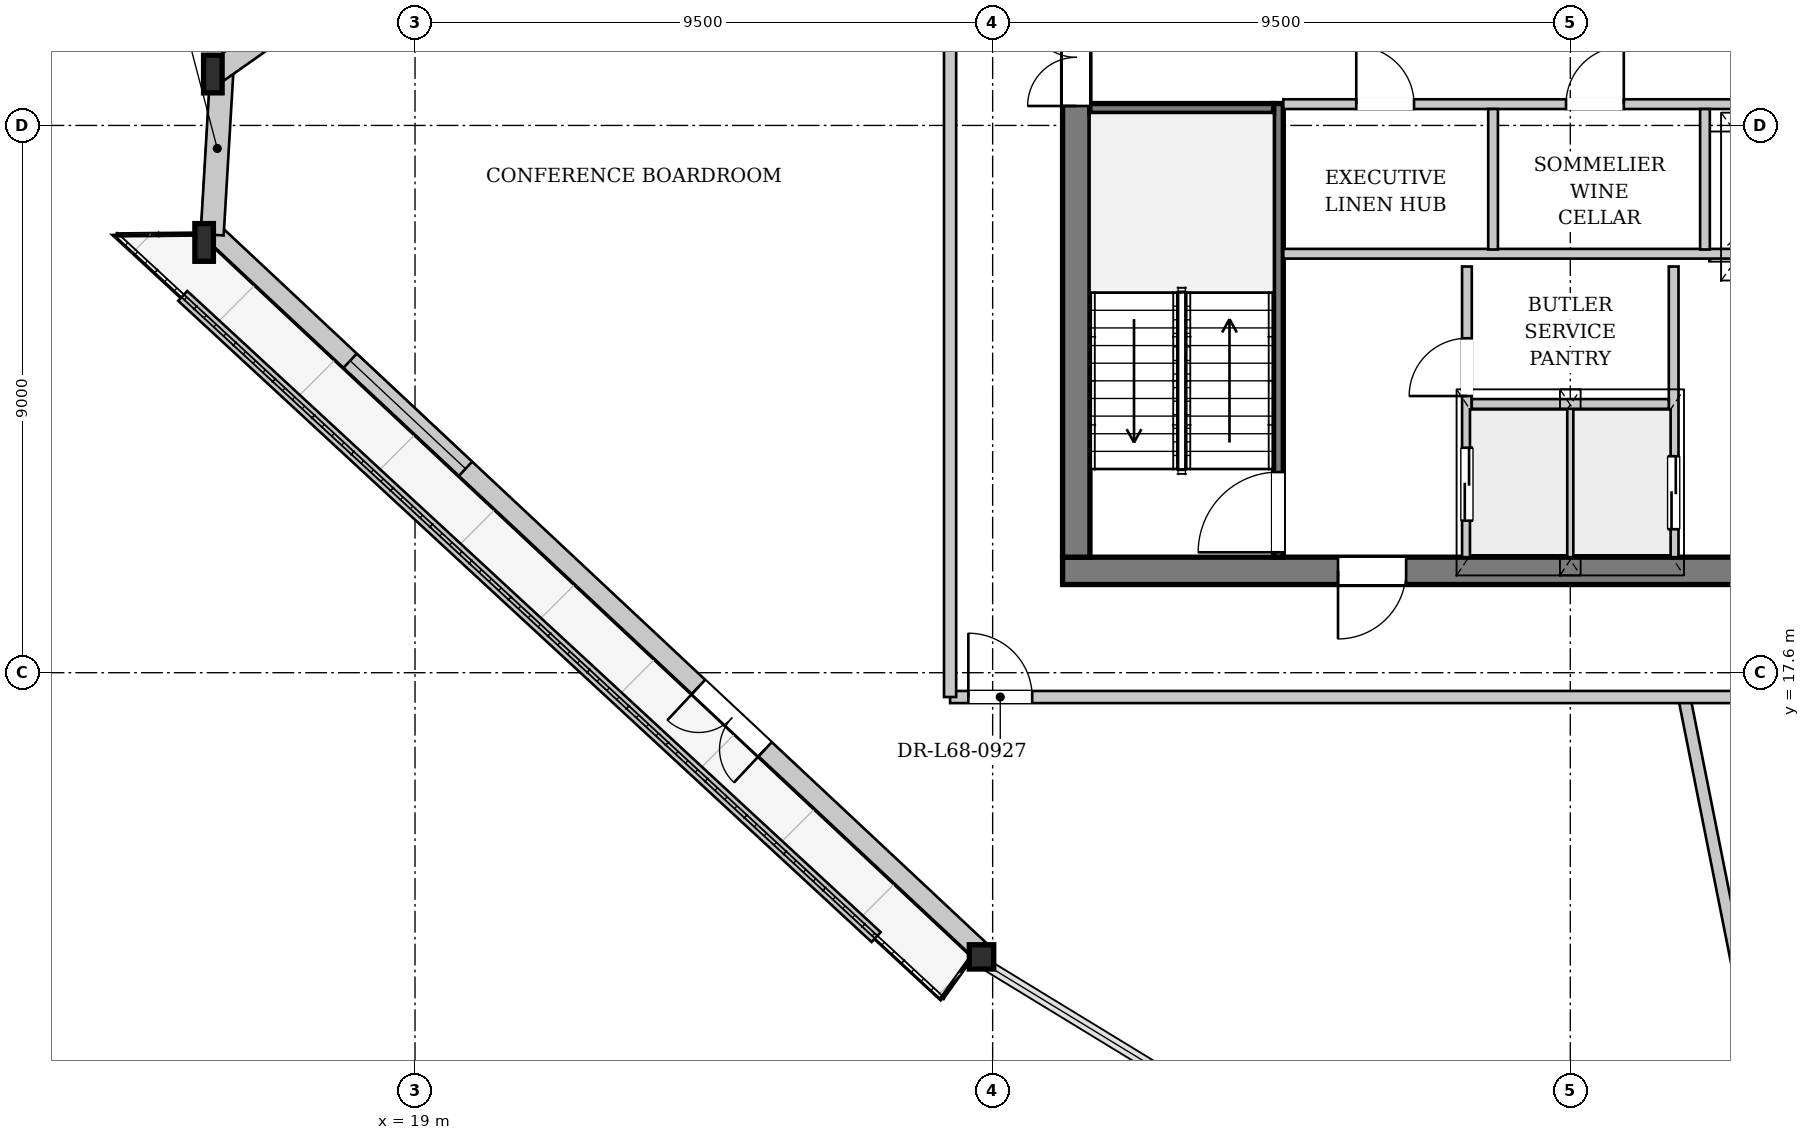
"""IFC4 building model, lengths in metres.
Left out: names, types, materials, properties, quantities, classifications, styles, units other than length and angle.
Written with IfcOpenShell. Run it as: python <this file> out.ifc"""

import sys

from ifc_helpers import new_model, si_unit, direction, frame, frame_2d, origin, origin_2d, place, context, subcontext, project, spatial, rectangle, i_section, extrude, source, transform, mapped, element, fill, save


model = new_model("IFC4")
c1 = context("Model", 3, precision=1e-05, world=origin(), true_north=direction((0.0, 1.0)))
c2 = subcontext(c1, "Body", "Model", "MODEL_VIEW")
j1 = project(units=[si_unit("LENGTHUNIT", "METRE"), si_unit("PLANEANGLEUNIT", "RADIAN")], contexts=[c1])
p1 = place(None, origin())
s1 = spatial("IfcSite", under=j1, at=p1, CompositionType="ELEMENT")
p2 = place(p1, origin())
s2 = spatial("IfcBuilding", under=s1, at=p2, CompositionType="ELEMENT")
p3 = place(p2, frame((0.0, 0.0, 256.1)))
s3 = spatial("IfcBuildingStorey", under=s2, at=p3, CompositionType="ELEMENT", Elevation=256.1)
m1 = source(origin(), c2, "Body", "SweptSolid", [
    extrude(i_section(OverallWidth=0.305, OverallDepth=0.62, WebThickness=0.021, FlangeThickness=0.04, at=origin_2d()), origin(), (0.0, 0.0, 1.0), 3.46),
])
p4 = place(p3, frame((15.642, 27.651, 0.0), z_axis=(0.018981595146, -0.118617328776, 0.992758595208), x_axis=(0.987436966063, 0.158013410988, 0.0)))
e1 = element("IfcColumn", 1, at=p4, inside=s3, PredefinedType="COLUMN", context=c2, shape_type="MappedRepresentation", body=[
    mapped(m1, transform((0.0, 0.0, 0.0), x_axis=(1.0, 0.0, 0.0), y_axis=(0.0, 1.0, 0.0), z_axis=(0.0, 0.0, 1.0), scale=1.0)),
])
m2 = source(origin(), c2, "Body", "SweptSolid", [
    extrude(i_section(OverallWidth=0.305, OverallDepth=0.62, WebThickness=0.021, FlangeThickness=0.04, at=origin_2d()), origin(), (0.0, 0.0, 1.0), 3.448),
])
p5 = place(p3, frame((15.474, 24.814, 0.0), z_axis=(0.03363437242, -0.080156020168, 0.996214706488), x_axis=(0.922110017929, 0.386927790209, 0.0)))
e2 = element("IfcColumn", 2, at=p5, inside=s3, PredefinedType="COLUMN", context=c2, shape_type="MappedRepresentation", body=[
    mapped(m2, transform((0.0, 0.0, 0.0), x_axis=(1.0, 0.0, 0.0), y_axis=(0.0, 1.0, 0.0), z_axis=(0.0, 0.0, 1.0), scale=1.0)),
])
m3 = source(origin(), c2, "Body", "SweptSolid", [
    extrude(i_section(OverallWidth=0.401, OverallDepth=0.399, WebThickness=0.022, FlangeThickness=0.034, at=origin_2d()), origin(), (0.0, 0.0, 1.0), 3.449),
])
p6 = place(p3, frame((28.162, 12.937, 0.0), z_axis=(0.089761957636, -0.005663214993, 0.995947146669), x_axis=(0.062966287351, 0.998015654515, 0.0)))
e3 = element("IfcColumn", 3, at=p6, inside=s3, PredefinedType="COLUMN", context=c2, shape_type="MappedRepresentation", body=[
    mapped(m3, transform((0.0, 0.0, 0.0), x_axis=(1.0, 0.0, 0.0), y_axis=(0.0, 1.0, 0.0), z_axis=(0.0, 0.0, 1.0), scale=1.0)),
])
p7 = place(p3, frame((28.271, 13.053, 0.0), z_axis=(0.0, 0.0, 1.0), x_axis=(-0.730047343923, 0.683396572739, 0.0)))
e4 = element("IfcWall", 4, at=p7, inside=s3, PredefinedType="SOLIDWALL", context=c2, shape_type="SweptSolid", body=[
    extrude(rectangle(XDim=17.38, YDim=0.32, at=frame_2d((8.69, 0.0))), origin(), (0.0, 0.0, 1.0), 2.872),
])
p8 = place(p7, frame((4.812, 0.0, 0.0)))
e5 = element("IfcOpeningElement", 5, at=p8, cuts=e4, PredefinedType="OPENING", context=c2, shape_type="SweptSolid", body=[
    extrude(rectangle(XDim=1.5, YDim=2.3, at=frame_2d((0.75, 1.15))), frame((0.0, 0.17, 0.0), z_axis=(0.0, -1.0, 0.0), x_axis=(1.0, 0.0, 0.0)), (0.0, 0.0, 1.0), 0.34),
])
p9 = place(p7, frame((11.561, 0.0, 0.402)))
e6 = element("IfcOpeningElement", 6, at=p9, cuts=e4, PredefinedType="OPENING", context=c2, shape_type="SweptSolid", body=[
    extrude(rectangle(XDim=2.6, YDim=2.35, at=frame_2d((1.3, 1.175))), frame((0.0, 0.17, 0.0), z_axis=(0.0, -1.0, 0.0), x_axis=(1.0, 0.0, 0.0)), (0.0, 0.0, 1.0), 0.34),
])
p10 = place(p3, frame((15.664, 24.802, 0.0), z_axis=(0.0, 0.0, 1.0), x_axis=(0.05918528466, 0.998247014561, 0.0)))
e7 = element("IfcWall", 7, at=p10, inside=s3, PredefinedType="SOLIDWALL", context=c2, shape_type="SweptSolid", body=[
    extrude(rectangle(XDim=2.842, YDim=0.38, at=frame_2d((1.421, 0.0))), origin(), (0.0, 0.0, 1.0), 2.872),
])
p11 = place(p3, frame((15.751, 27.495, 0.0), z_axis=(0.0, 0.0, 1.0), x_axis=(0.818194527571, 0.574941488373, 0.0)))
e8 = element("IfcWall", 8, at=p11, inside=s3, PredefinedType="SOLIDWALL", context=c2, shape_type="SweptSolid", body=[
    extrude(rectangle(XDim=21.931, YDim=0.38, at=frame_2d((10.965, 0.0))), origin(), (0.0, 0.0, 1.0), 2.872),
])
p12 = place(p11, frame((5.041, 0.0, 0.502)))
e9 = element("IfcOpeningElement", 9, at=p12, cuts=e8, PredefinedType="OPENING", context=c2, shape_type="SweptSolid", body=[
    extrude(rectangle(XDim=2.2, YDim=2.25, at=frame_2d((1.1, 1.125))), frame((0.0, 0.2, 0.0), z_axis=(0.0, -1.0, 0.0), x_axis=(1.0, 0.0, 0.0)), (0.0, 0.0, 1.0), 0.4),
])
p13 = place(p11, frame((15.79, 0.0, 0.502)))
e10 = element("IfcOpeningElement", 10, at=p13, cuts=e8, PredefinedType="OPENING", context=c2, shape_type="SweptSolid", body=[
    extrude(rectangle(XDim=2.2, YDim=2.25, at=frame_2d((1.1, 1.125))), frame((0.0, 0.2, 0.0), z_axis=(0.0, -1.0, 0.0), x_axis=(1.0, 0.0, 0.0)), (0.0, 0.0, 1.0), 0.4),
])
p14 = place(p3, frame((15.181, 23.796, 0.0), z_axis=(0.0, 0.0, 1.0), x_axis=(0.734232444262, -0.678898164523, 0.0)))
e11 = element("IfcWall", 11, at=p14, inside=s3, PredefinedType="PARAPET", context=c2, shape_type="SweptSolid", body=[
    extrude(rectangle(XDim=15.531, YDim=0.22, at=frame_2d((7.765, 0.0))), origin(), (0.0, 0.0, 1.0), 0.3),
])
p15 = place(p3, frame((46.35, 19.275, 0.0), z_axis=(0.0, 0.0, 1.0), x_axis=(-1.0, 0.0, 0.0)))
e12 = element("IfcWall", 12, at=p15, inside=s3, PredefinedType="SHEAR", context=c2, shape_type="SweptSolid", body=[
    extrude(rectangle(XDim=16.7, YDim=0.45, at=frame_2d((8.35, 0.0))), origin(), (0.0, 0.0, 1.0), 3.38),
])
p16 = place(p15, frame((4.55, 0.0, 0.0)))
e13 = element("IfcOpeningElement", 13, at=p16, cuts=e12, PredefinedType="OPENING", context=c2, shape_type="SweptSolid", body=[
    extrude(rectangle(XDim=1.12, YDim=2.25, at=frame_2d((0.56, 1.125))), frame((0.0, 0.235, 0.0), z_axis=(0.0, -1.0, 0.0), x_axis=(1.0, 0.0, 0.0)), (0.0, 0.0, 1.0), 0.47),
])
p17 = place(p15, frame((11.05, 0.0, 0.0)))
e14 = element("IfcOpeningElement", 14, at=p17, cuts=e12, PredefinedType="OPENING", context=c2, shape_type="SweptSolid", body=[
    extrude(rectangle(XDim=1.12, YDim=2.25, at=frame_2d((0.56, 1.125))), frame((0.0, 0.235, 0.0), z_axis=(0.0, -1.0, 0.0), x_axis=(1.0, 0.0, 0.0)), (0.0, 0.0, 1.0), 0.47),
])
p18 = place(p3, frame((29.875, 19.5, 0.0), z_axis=(0.0, 0.0, 1.0), x_axis=(0.0, 1.0, 0.0)))
e15 = element("IfcWall", 15, at=p18, inside=s3, PredefinedType="SHEAR", context=c2, shape_type="SweptSolid", body=[
    extrude(rectangle(XDim=14.2, YDim=0.45, at=frame_2d((7.1, 0.0))), origin(), (0.0, 0.0, 1.0), 3.38),
])
p19 = place(p18, frame((7.42, 0.0, 0.0)))
e16 = element("IfcOpeningElement", 16, at=p19, cuts=e15, PredefinedType="OPENING", context=c2, shape_type="SweptSolid", body=[
    extrude(rectangle(XDim=1.6, YDim=2.2, at=frame_2d((0.8, 1.1))), frame((0.0, 0.235, 0.0), z_axis=(0.0, -1.0, 0.0), x_axis=(1.0, 0.0, 0.0)), (0.0, 0.0, 1.0), 0.47),
])
p20 = place(p3, frame((33.2, 19.5, 0.0), z_axis=(0.0, 0.0, 1.0), x_axis=(0.0, 1.0, 0.0)))
e17 = element("IfcWall", 17, at=p20, inside=s3, PredefinedType="PARTITIONING", context=c2, shape_type="SweptSolid", body=[
    extrude(rectangle(XDim=7.46, YDim=0.16, at=frame_2d((3.73, 0.0))), origin(), (0.0, 0.0, 1.0), 3.38),
])
p21 = place(p20, frame((0.08, 0.0, 0.0)))
e18 = element("IfcOpeningElement", 18, at=p21, cuts=e17, PredefinedType="OPENING", context=c2, shape_type="SweptSolid", body=[
    extrude(rectangle(XDim=1.32, YDim=2.2, at=frame_2d((0.66, 1.1))), frame((0.0, 0.09, 0.0), z_axis=(0.0, -1.0, 0.0), x_axis=(1.0, 0.0, 0.0)), (0.0, 0.0, 1.0), 0.18),
])
p22 = place(p3, frame((30.1, 26.88, 0.0), z_axis=(0.0, 0.0, 1.0), x_axis=(1.0, 0.0, 0.0)))
e19 = element("IfcWall", 19, at=p22, inside=s3, PredefinedType="PARTITIONING", context=c2, shape_type="SweptSolid", body=[
    extrude(rectangle(XDim=3.02, YDim=0.16, at=frame_2d((1.51, 0.0))), origin(), (0.0, 0.0, 1.0), 3.38),
])
p23 = place(p3, frame((36.3, 19.5, 0.0), z_axis=(0.0, 0.0, 1.0), x_axis=(0.0, 1.0, 0.0)))
e20 = element("IfcWall", 20, at=p23, inside=s3, PredefinedType="PARTITIONING", context=c2, shape_type="SweptSolid", body=[
    extrude(rectangle(XDim=4.78, YDim=0.16, at=frame_2d((2.39, 0.0))), origin(), (0.0, 0.0, 1.0), 3.38),
])
p24 = place(p23, frame((0.6, 0.0, 0.0)))
e21 = element("IfcOpeningElement", 21, at=p24, cuts=e20, PredefinedType="OPENING", context=c2, shape_type="SweptSolid", body=[
    extrude(rectangle(XDim=1.2, YDim=2.2, at=frame_2d((0.6, 1.1))), frame((0.0, 0.09, 0.0), z_axis=(0.0, -1.0, 0.0), x_axis=(1.0, 0.0, 0.0)), (0.0, 0.0, 1.0), 0.18),
])
p25 = place(p23, frame((2.65, 0.0, 0.0)))
e22 = element("IfcOpeningElement", 22, at=p25, cuts=e20, PredefinedType="OPENING", context=c2, shape_type="SweptSolid", body=[
    extrude(rectangle(XDim=0.95, YDim=2.1, at=frame_2d((0.475, 1.05))), frame((0.0, 0.09, 0.0), z_axis=(0.0, -1.0, 0.0), x_axis=(1.0, 0.0, 0.0)), (0.0, 0.0, 1.0), 0.18),
])
p26 = place(p3, frame((39.7, 24.28, 0.0), z_axis=(0.0, 0.0, 1.0), x_axis=(0.0, -1.0, 0.0)))
e23 = element("IfcWall", 23, at=p26, inside=s3, PredefinedType="PARTITIONING", context=c2, shape_type="SweptSolid", body=[
    extrude(rectangle(XDim=4.78, YDim=0.16, at=frame_2d((2.39, 0.0))), origin(), (0.0, 0.0, 1.0), 3.38),
])
p27 = place(p26, frame((3.12, 0.0, 0.0)))
e24 = element("IfcOpeningElement", 24, at=p27, cuts=e23, PredefinedType="OPENING", context=c2, shape_type="SweptSolid", body=[
    extrude(rectangle(XDim=1.2, YDim=2.2, at=frame_2d((0.6, 1.1))), frame((0.0, 0.09, 0.0), z_axis=(0.0, -1.0, 0.0), x_axis=(1.0, 0.0, 0.0)), (0.0, 0.0, 1.0), 0.18),
])
p28 = place(p3, frame((38.0, 19.5, 0.0), z_axis=(0.0, 0.0, 1.0), x_axis=(0.0, 1.0, 0.0)))
e25 = element("IfcWall", 25, at=p28, inside=s3, PredefinedType="PARTITIONING", context=c2, shape_type="SweptSolid", body=[
    extrude(rectangle(XDim=2.46, YDim=0.125, at=frame_2d((1.23, 0.0))), origin(), (0.0, 0.0, 1.0), 3.38),
])
p29 = place(p3, frame((36.38, 22.02, 0.0), z_axis=(0.0, 0.0, 1.0), x_axis=(1.0, 0.0, 0.0)))
e26 = element("IfcWall", 26, at=p29, inside=s3, PredefinedType="PARTITIONING", context=c2, shape_type="SweptSolid", body=[
    extrude(rectangle(XDim=3.24, YDim=0.16, at=frame_2d((1.62, 0.0))), origin(), (0.0, 0.0, 1.0), 3.38),
])
p30 = place(p3, frame((33.28, 24.49, 0.0), z_axis=(0.0, 0.0, 1.0), x_axis=(1.0, 0.0, 0.0)))
e27 = element("IfcWall", 27, at=p30, inside=s3, PredefinedType="PARTITIONING", context=c2, shape_type="SweptSolid", body=[
    extrude(rectangle(XDim=9.44, YDim=0.16, at=frame_2d((4.72, 0.0))), origin(), (0.0, 0.0, 1.0), 3.38),
])
p31 = place(p3, frame((33.28, 26.95, 0.0), z_axis=(0.0, 0.0, 1.0), x_axis=(1.0, 0.0, 0.0)))
e28 = element("IfcWall", 28, at=p31, inside=s3, PredefinedType="PARTITIONING", context=c2, shape_type="SweptSolid", body=[
    extrude(rectangle(XDim=9.44, YDim=0.16, at=frame_2d((4.72, 0.0))), origin(), (0.0, 0.0, 1.0), 3.38),
])
p32 = place(p31, frame((1.2, 0.0, 0.0)))
e29 = element("IfcOpeningElement", 29, at=p32, cuts=e28, PredefinedType="OPENING", context=c2, shape_type="SweptSolid", body=[
    extrude(rectangle(XDim=0.95, YDim=2.1, at=frame_2d((0.475, 1.05))), frame((0.0, 0.09, 0.0), z_axis=(0.0, -1.0, 0.0), x_axis=(1.0, 0.0, 0.0)), (0.0, 0.0, 1.0), 0.18),
])
p33 = place(p31, frame((4.65, 0.0, 0.0)))
e30 = element("IfcOpeningElement", 30, at=p33, cuts=e28, PredefinedType="OPENING", context=c2, shape_type="SweptSolid", body=[
    extrude(rectangle(XDim=0.95, YDim=2.1, at=frame_2d((0.475, 1.05))), frame((0.0, 0.09, 0.0), z_axis=(0.0, -1.0, 0.0), x_axis=(1.0, 0.0, 0.0)), (0.0, 0.0, 1.0), 0.18),
])
p34 = place(p31, frame((7.67, 0.0, 0.0)))
e31 = element("IfcOpeningElement", 31, at=p34, cuts=e28, PredefinedType="OPENING", context=c2, shape_type="SweptSolid", body=[
    extrude(rectangle(XDim=1.1, YDim=2.2, at=frame_2d((0.55, 1.1))), frame((0.0, 0.09, 0.0), z_axis=(0.0, -1.0, 0.0), x_axis=(1.0, 0.0, 0.0)), (0.0, 0.0, 1.0), 0.18),
])
for number, where, z_axis, x_axis in (
    (32, (36.73, 24.56, 0.0), (0.0, 0.0, 1.0), (0.0, 1.0, 0.0)),
    (33, (40.215, 24.56, 0.0), (0.0, 0.0, 1.0), (0.0, 1.0, 0.0)),
):
    element("IfcWall", number, at=place(p3, frame(where, z_axis=z_axis, x_axis=x_axis)), inside=s3, PredefinedType="PARTITIONING", context=c2, shape_type="SweptSolid", body=[
        extrude(rectangle(XDim=2.31, YDim=0.16, at=frame_2d((1.155, 0.0))), origin(), (0.0, 0.0, 1.0), 3.38),
    ])
p35 = place(p3, frame((39.873, 17.2, 0.0), z_axis=(0.0, 0.0, 1.0), x_axis=(0.195475995278, -0.980708486386, 0.0)))
e34 = element("IfcWall", 34, at=p35, inside=s3, PredefinedType="PARTITIONING", context=c2, shape_type="SweptSolid", body=[
    extrude(rectangle(XDim=13.203, YDim=0.2, at=frame_2d((6.601, 0.0))), origin(), (0.0, 0.0, 1.0), 3.38),
])
p36 = place(p3, frame((27.8, 17.2, 0.0), z_axis=(0.0, 0.0, 1.0), x_axis=(1.0, 0.0, 0.0)))
e35 = element("IfcWall", 35, at=p36, inside=s3, PredefinedType="PARTITIONING", context=c2, shape_type="SweptSolid", body=[
    extrude(rectangle(XDim=20.4, YDim=0.2, at=frame_2d((10.2, 0.0))), origin(), (0.0, 0.0, 1.0), 3.38),
])
p37 = place(p36, frame((0.3, 0.0, 0.0)))
e36 = element("IfcOpeningElement", 36, at=p37, cuts=e35, PredefinedType="OPENING", context=c2, shape_type="SweptSolid", body=[
    extrude(rectangle(XDim=1.05, YDim=2.2, at=frame_2d((0.525, 1.1))), frame((0.0, 0.11, 0.0), z_axis=(0.0, -1.0, 0.0), x_axis=(1.0, 0.0, 0.0)), (0.0, 0.0, 1.0), 0.22),
])
p38 = place(p3, frame((27.8, 17.2, 0.0), z_axis=(0.0, 0.0, 1.0), x_axis=(0.0, 1.0, 0.0)))
e37 = element("IfcWall", 37, at=p38, inside=s3, PredefinedType="PARTITIONING", context=c2, shape_type="SweptSolid", body=[
    extrude(rectangle(XDim=18.8, YDim=0.2, at=frame_2d((9.4, 0.0))), origin(), (0.0, 0.0, 1.0), 3.38),
])
m4 = source(origin(), c2, "Body", "SweptSolid", [
    extrude(rectangle(XDim=1.5, YDim=2.3, at=frame_2d((0.75, 1.15))), frame((0.0, 0.025, 0.0), z_axis=(0.0, -1.0, 0.0), x_axis=(1.0, 0.0, 0.0)), (0.0, 0.0, 1.0), 0.05),
])
p39 = place(p8, origin())
e38 = element("IfcDoor", 38, at=p39, inside=s3, OperationType="DOUBLE_DOOR_SINGLE_SWING", PredefinedType="DOOR", context=c2, shape_type="MappedRepresentation", body=[
    mapped(m4, transform((0.0, 0.0, 0.0), x_axis=(1.0, 0.0, 0.0), y_axis=(0.0, 1.0, 0.0), z_axis=(0.0, 0.0, 1.0), scale=1.0)),
])
fill(e5, e38)
m5 = source(origin(), c2, "Body", "SweptSolid", [
    extrude(rectangle(XDim=2.6, YDim=2.35, at=frame_2d((1.3, 1.175))), frame((0.0, 0.03, 0.0), z_axis=(0.0, -1.0, 0.0), x_axis=(1.0, 0.0, 0.0)), (0.0, 0.0, 1.0), 0.06),
])
p40 = place(p9, origin())
e39 = element("IfcWindow", 39, at=p40, inside=s3, PartitioningType="SINGLE_PANEL", PredefinedType="WINDOW", context=c2, shape_type="MappedRepresentation", body=[
    mapped(m5, transform((0.0, 0.0, 0.0), x_axis=(1.0, 0.0, 0.0), y_axis=(0.0, 1.0, 0.0), z_axis=(0.0, 0.0, 1.0), scale=1.0)),
])
fill(e6, e39)
m6 = source(origin(), c2, "Body", "SweptSolid", [
    extrude(rectangle(XDim=1.12, YDim=2.25, at=frame_2d((0.56, 1.125))), frame((0.0, 0.025, 0.0), z_axis=(0.0, -1.0, 0.0), x_axis=(1.0, 0.0, 0.0)), (0.0, 0.0, 1.0), 0.05),
])
p41 = place(p17, origin())
e40 = element("IfcDoor", 40, at=p41, inside=s3, OperationType="SINGLE_SWING_RIGHT", PredefinedType="DOOR", context=c2, shape_type="MappedRepresentation", body=[
    mapped(m6, transform((0.0, 0.0, 0.0), x_axis=(1.0, 0.0, 0.0), y_axis=(0.0, 1.0, 0.0), z_axis=(0.0, 0.0, 1.0), scale=1.0)),
])
fill(e14, e40)
m7 = source(origin(), c2, "Body", "SweptSolid", [
    extrude(rectangle(XDim=1.6, YDim=2.2, at=frame_2d((0.8, 1.1))), frame((0.0, 0.025, 0.0), z_axis=(0.0, -1.0, 0.0), x_axis=(1.0, 0.0, 0.0)), (0.0, 0.0, 1.0), 0.05),
])
p42 = place(p19, origin())
e41 = element("IfcDoor", 41, at=p42, inside=s3, OperationType="DOUBLE_DOOR_SINGLE_SWING", PredefinedType="DOOR", context=c2, shape_type="MappedRepresentation", body=[
    mapped(m7, transform((0.0, 0.0, 0.0), x_axis=(1.0, 0.0, 0.0), y_axis=(0.0, 1.0, 0.0), z_axis=(0.0, 0.0, 1.0), scale=1.0)),
])
fill(e16, e41)
m8 = source(origin(), c2, "Body", "SweptSolid", [
    extrude(rectangle(XDim=1.32, YDim=2.2, at=frame_2d((0.66, 1.1))), frame((0.0, 0.025, 0.0), z_axis=(0.0, -1.0, 0.0), x_axis=(1.0, 0.0, 0.0)), (0.0, 0.0, 1.0), 0.05),
])
p43 = place(p21, origin())
e42 = element("IfcDoor", 42, at=p43, inside=s3, OperationType="SINGLE_SWING_LEFT", PredefinedType="DOOR", context=c2, shape_type="MappedRepresentation", body=[
    mapped(m8, transform((0.0, 0.0, 0.0), x_axis=(1.0, 0.0, 0.0), y_axis=(0.0, 1.0, 0.0), z_axis=(0.0, 0.0, 1.0), scale=1.0)),
])
fill(e18, e42)
m9 = source(origin(), c2, "Body", "SweptSolid", [
    extrude(rectangle(XDim=1.2, YDim=2.2, at=frame_2d((0.6, 1.1))), frame((0.0, 0.025, 0.0), z_axis=(0.0, -1.0, 0.0), x_axis=(1.0, 0.0, 0.0)), (0.0, 0.0, 1.0), 0.05),
])
p44 = place(p24, origin())
e43 = element("IfcDoor", 43, at=p44, inside=s3, OperationType="DOUBLE_DOOR_SLIDING", PredefinedType="DOOR", context=c2, shape_type="MappedRepresentation", body=[
    mapped(m9, transform((0.0, 0.0, 0.0), x_axis=(1.0, 0.0, 0.0), y_axis=(0.0, 1.0, 0.0), z_axis=(0.0, 0.0, 1.0), scale=1.0)),
])
fill(e21, e43)
m10 = source(origin(), c2, "Body", "SweptSolid", [
    extrude(rectangle(XDim=0.95, YDim=2.1, at=frame_2d((0.475, 1.05))), frame((0.0, 0.025, 0.0), z_axis=(0.0, -1.0, 0.0), x_axis=(1.0, 0.0, 0.0)), (0.0, 0.0, 1.0), 0.05),
])
p45 = place(p25, origin())
e44 = element("IfcDoor", 44, at=p45, inside=s3, OperationType="SINGLE_SWING_LEFT", PredefinedType="DOOR", context=c2, shape_type="MappedRepresentation", body=[
    mapped(m10, transform((0.0, 0.0, 0.0), x_axis=(1.0, 0.0, 0.0), y_axis=(0.0, 1.0, 0.0), z_axis=(0.0, 0.0, 1.0), scale=1.0)),
])
fill(e22, e44)
p46 = place(p27, origin())
e45 = element("IfcDoor", 45, at=p46, inside=s3, OperationType="DOUBLE_DOOR_SLIDING", PredefinedType="DOOR", context=c2, shape_type="MappedRepresentation", body=[
    mapped(m9, transform((0.0, 0.0, 0.0), x_axis=(1.0, 0.0, 0.0), y_axis=(0.0, 1.0, 0.0), z_axis=(0.0, 0.0, 1.0), scale=1.0)),
])
fill(e24, e45)
p47 = place(p32, origin())
e46 = element("IfcDoor", 46, at=p47, inside=s3, OperationType="SINGLE_SWING_LEFT", PredefinedType="DOOR", context=c2, shape_type="MappedRepresentation", body=[
    mapped(m10, transform((0.0, 0.0, 0.0), x_axis=(1.0, 0.0, 0.0), y_axis=(0.0, 1.0, 0.0), z_axis=(0.0, 0.0, 1.0), scale=1.0)),
])
fill(e29, e46)
p48 = place(p33, origin())
e47 = element("IfcDoor", 47, at=p48, inside=s3, OperationType="SINGLE_SWING_RIGHT", PredefinedType="DOOR", context=c2, shape_type="MappedRepresentation", body=[
    mapped(m10, transform((0.0, 0.0, 0.0), x_axis=(1.0, 0.0, 0.0), y_axis=(0.0, 1.0, 0.0), z_axis=(0.0, 0.0, 1.0), scale=1.0)),
])
fill(e30, e47)
m11 = source(origin(), c2, "Body", "SweptSolid", [
    extrude(rectangle(XDim=1.05, YDim=2.2, at=frame_2d((0.525, 1.1))), frame((0.0, 0.025, 0.0), z_axis=(0.0, -1.0, 0.0), x_axis=(1.0, 0.0, 0.0)), (0.0, 0.0, 1.0), 0.05),
])
p49 = place(p37, origin())
e48 = element("IfcDoor", 48, at=p49, inside=s3, OperationType="SINGLE_SWING_LEFT", PredefinedType="DOOR", context=c2, shape_type="MappedRepresentation", body=[
    mapped(m11, transform((0.0, 0.0, 0.0), x_axis=(1.0, 0.0, 0.0), y_axis=(0.0, 1.0, 0.0), z_axis=(0.0, 0.0, 1.0), scale=1.0)),
])
fill(e36, e48)
save(model, sys.argv[1])
